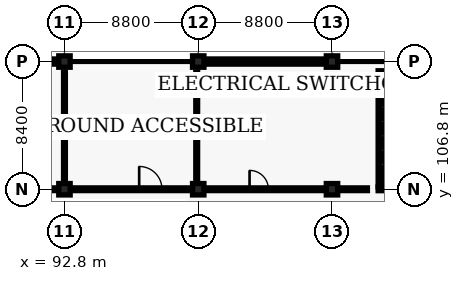
"""IFC4 building model, lengths in metres.
Left out: names, types, materials, properties, quantities, classifications, styles, units other than length and angle.
Written with IfcOpenShell. Run it as: python <this file> out.ifc"""

import sys

from ifc_helpers import new_model, si_unit, direction, frame, frame_2d, origin, origin_2d, place, context, subcontext, project, spatial, rectangle, extrude, element, fill, save


model = new_model("IFC4")
c1 = context("Model", 3, precision=1e-05, world=origin(), true_north=direction((0.0, 1.0)))
c2 = subcontext(c1, "Body", "Model", "MODEL_VIEW")
j1 = project(units=[si_unit("LENGTHUNIT", "METRE"), si_unit("PLANEANGLEUNIT", "RADIAN")], contexts=[c1])
p1 = place(None, origin())
s1 = spatial("IfcSite", under=j1, at=p1, CompositionType="ELEMENT")
p2 = place(p1, origin())
s2 = spatial("IfcBuilding", under=s1, at=p2, CompositionType="ELEMENT")
p3 = place(p2, origin())
s3 = spatial("IfcBuildingStorey", under=s2, at=p3, CompositionType="ELEMENT", Elevation=0.0)
for number, where, z_axis, x_axis in (
    (1, (92.8, 106.8, 0.0), (0.0, 0.0, 1.0), (1.0, 0.0, 0.0)),
    (2, (92.8, 115.2, 0.0), (0.0, 0.0, 1.0), (1.0, 0.0, 0.0)),
    (3, (101.6, 106.8, 0.0), (0.0, 0.0, 1.0), (1.0, 0.0, 0.0)),
    (4, (101.6, 115.2, 0.0), (0.0, 0.0, 1.0), (1.0, 0.0, 0.0)),
    (5, (110.4, 106.8, 0.0), (0.0, 0.0, 1.0), (1.0, 0.0, 0.0)),
    (6, (110.4, 115.2, 0.0), (0.0, 0.0, 1.0), (1.0, 0.0, 0.0)),
):
    element("IfcColumn", number, at=place(p3, frame(where, z_axis=z_axis, x_axis=x_axis)), inside=s3, PredefinedType="COLUMN", context=c2, shape_type="SweptSolid", body=[
        extrude(rectangle(XDim=0.75, YDim=0.75, at=origin_2d()), origin(), (0.0, 0.0, 1.0), 4.8),
    ])
p4 = place(p3, frame((84.1, 115.2, 0.0), z_axis=(0.0, 0.0, 1.0), x_axis=(1.0, 0.0, 0.0)))
e7 = element("IfcWall", 7, at=p4, inside=s3, PredefinedType="SOLIDWALL", context=c2, shape_type="SweptSolid", body=[
    extrude(rectangle(XDim=8.6, YDim=0.34, at=frame_2d((4.3, 0.0))), origin(), (0.0, 0.0, 1.0), 3.675),
])
p5 = place(p4, frame((1.817, 0.0, 0.95)))
e8 = element("IfcOpeningElement", 8, at=p5, cuts=e7, PredefinedType="OPENING", context=c2, shape_type="SweptSolid", body=[
    extrude(rectangle(XDim=2.1, YDim=1.8, at=frame_2d((1.05, 0.9))), frame((0.0, 0.18, 0.0), z_axis=(0.0, -1.0, 0.0), x_axis=(1.0, 0.0, 0.0)), (0.0, 0.0, 1.0), 0.36),
])
p6 = place(p4, frame((4.683, 0.0, 0.95)))
e9 = element("IfcOpeningElement", 9, at=p6, cuts=e7, PredefinedType="OPENING", context=c2, shape_type="SweptSolid", body=[
    extrude(rectangle(XDim=2.1, YDim=1.8, at=frame_2d((1.05, 0.9))), frame((0.0, 0.18, 0.0), z_axis=(0.0, -1.0, 0.0), x_axis=(1.0, 0.0, 0.0)), (0.0, 0.0, 1.0), 0.36),
])
p7 = place(p3, frame((101.7, 115.2, 0.0), z_axis=(0.0, 0.0, 1.0), x_axis=(1.0, 0.0, 0.0)))
e10 = element("IfcWall", 10, at=p7, inside=s3, PredefinedType="SOLIDWALL", context=c2, shape_type="SweptSolid", body=[
    extrude(rectangle(XDim=8.6, YDim=0.34, at=frame_2d((4.3, 0.0))), origin(), (0.0, 0.0, 1.0), 3.675),
])
p8 = place(p7, frame((1.817, 0.0, 0.95)))
e11 = element("IfcOpeningElement", 11, at=p8, cuts=e10, PredefinedType="OPENING", context=c2, shape_type="SweptSolid", body=[
    extrude(rectangle(XDim=2.1, YDim=1.8, at=frame_2d((1.05, 0.9))), frame((0.0, 0.18, 0.0), z_axis=(0.0, -1.0, 0.0), x_axis=(1.0, 0.0, 0.0)), (0.0, 0.0, 1.0), 0.36),
])
p9 = place(p7, frame((4.683, 0.0, 0.95)))
e12 = element("IfcOpeningElement", 12, at=p9, cuts=e10, PredefinedType="OPENING", context=c2, shape_type="SweptSolid", body=[
    extrude(rectangle(XDim=2.1, YDim=1.8, at=frame_2d((1.05, 0.9))), frame((0.0, 0.18, 0.0), z_axis=(0.0, -1.0, 0.0), x_axis=(1.0, 0.0, 0.0)), (0.0, 0.0, 1.0), 0.36),
])
p10 = place(p3, frame((117.045, 106.83, 0.0), z_axis=(0.0, 0.0, 1.0), x_axis=(-1.0, 0.0, 0.0)))
e13 = element("IfcWall", 13, at=p10, inside=s3, PredefinedType="SHEAR", context=c2, shape_type="SweptSolid", body=[
    extrude(rectangle(XDim=3.61, YDim=0.25, at=frame_2d((1.805, 0.0))), origin(), (0.0, 0.0, 1.0), 4.56),
])
p11 = place(p10, frame((1.205, 0.0, 0.0)))
e14 = element("IfcOpeningElement", 14, at=p11, cuts=e13, PredefinedType="OPENING", context=c2, shape_type="SweptSolid", body=[
    extrude(rectangle(XDim=1.2, YDim=2.15, at=frame_2d((0.6, 1.075))), frame((0.0, 0.135, 0.0), z_axis=(0.0, -1.0, 0.0), x_axis=(1.0, 0.0, 0.0)), (0.0, 0.0, 1.0), 0.27),
])
p12 = place(p3, frame((113.435, 114.47, 0.0), z_axis=(0.0, 0.0, 1.0), x_axis=(1.0, 0.0, 0.0)))
e15 = element("IfcWall", 15, at=p12, inside=s3, PredefinedType="SHEAR", context=c2, shape_type="SweptSolid", body=[
    extrude(rectangle(XDim=3.61, YDim=0.25, at=frame_2d((1.805, 0.0))), origin(), (0.0, 0.0, 1.0), 4.56),
])
p13 = place(p3, frame((113.56, 106.955, 0.0), z_axis=(0.0, 0.0, 1.0), x_axis=(0.0, 1.0, 0.0)))
e16 = element("IfcWall", 16, at=p13, inside=s3, PredefinedType="SHEAR", context=c2, shape_type="SweptSolid", body=[
    extrude(rectangle(XDim=7.39, YDim=0.25, at=frame_2d((3.695, 0.0))), origin(), (0.0, 0.0, 1.0), 4.56),
])
p14 = place(p3, frame((84.2, 106.8, 0.0), z_axis=(0.0, 0.0, 1.0), x_axis=(1.0, 0.0, 0.0)))
e17 = element("IfcWall", 17, at=p14, inside=s3, PredefinedType="PARTITIONING", context=c2, shape_type="SweptSolid", body=[
    extrude(rectangle(XDim=28.53, YDim=0.18, at=frame_2d((14.265, 0.0))), origin(), (0.0, 0.0, 1.0), 3.675),
])
p15 = place(p14, frame((6.033, 0.0, 0.0)))
e18 = element("IfcOpeningElement", 18, at=p15, cuts=e17, PredefinedType="OPENING", context=c2, shape_type="SweptSolid", body=[
    extrude(rectangle(XDim=1.3, YDim=2.2, at=frame_2d((0.65, 1.1))), frame((0.0, 0.1, 0.0), z_axis=(0.0, -1.0, 0.0), x_axis=(1.0, 0.0, 0.0)), (0.0, 0.0, 1.0), 0.2),
])
p16 = place(p14, frame((13.515, 0.0, 0.0)))
e19 = element("IfcOpeningElement", 19, at=p16, cuts=e17, PredefinedType="OPENING", context=c2, shape_type="SweptSolid", body=[
    extrude(rectangle(XDim=1.5, YDim=2.25, at=frame_2d((0.75, 1.125))), frame((0.0, 0.1, 0.0), z_axis=(0.0, -1.0, 0.0), x_axis=(1.0, 0.0, 0.0)), (0.0, 0.0, 1.0), 0.2),
])
p17 = place(p14, frame((20.777, 0.0, 0.0)))
e20 = element("IfcOpeningElement", 20, at=p17, cuts=e17, PredefinedType="OPENING", context=c2, shape_type="SweptSolid", body=[
    extrude(rectangle(XDim=1.24, YDim=2.2, at=frame_2d((0.62, 1.1))), frame((0.0, 0.1, 0.0), z_axis=(0.0, -1.0, 0.0), x_axis=(1.0, 0.0, 0.0)), (0.0, 0.0, 1.0), 0.2),
])
p18 = place(p3, frame((92.8, 107.3, 0.0), z_axis=(0.0, 0.0, 1.0), x_axis=(0.0, 1.0, 0.0)))
e21 = element("IfcWall", 21, at=p18, inside=s3, PredefinedType="PARTITIONING", context=c2, shape_type="SweptSolid", body=[
    extrude(rectangle(XDim=7.2, YDim=0.12, at=frame_2d((3.6, 0.0))), origin(), (0.0, 0.0, 1.0), 3.775),
])
p19 = place(p18, frame((3.07, 0.0, 0.0)))
e22 = element("IfcOpeningElement", 22, at=p19, cuts=e21, PredefinedType="OPENING", context=c2, shape_type="SweptSolid", body=[
    extrude(rectangle(XDim=1.06, YDim=2.16, at=frame_2d((0.53, 1.08))), frame((0.0, 0.07, 0.0), z_axis=(0.0, -1.0, 0.0), x_axis=(1.0, 0.0, 0.0)), (0.0, 0.0, 1.0), 0.14),
])
p20 = place(p3, frame((101.5, 107.3, 0.0), z_axis=(0.0, 0.0, 1.0), x_axis=(0.0, 1.0, 0.0)))
e23 = element("IfcWall", 23, at=p20, inside=s3, PredefinedType="PARTITIONING", context=c2, shape_type="SweptSolid", body=[
    extrude(rectangle(XDim=7.2, YDim=0.12, at=frame_2d((3.6, 0.0))), origin(), (0.0, 0.0, 1.0), 3.775),
])
p21 = place(p20, frame((3.1, 0.0, 0.0)))
e24 = element("IfcOpeningElement", 24, at=p21, cuts=e23, PredefinedType="OPENING", context=c2, shape_type="SweptSolid", body=[
    extrude(rectangle(XDim=1.0, YDim=2.14, at=frame_2d((0.5, 1.07))), frame((0.0, 0.07, 0.0), z_axis=(0.0, -1.0, 0.0), x_axis=(1.0, 0.0, 0.0)), (0.0, 0.0, 1.0), 0.14),
])
p22 = place(p8, origin())
e25 = element("IfcWindow", 25, at=p22, inside=s3, PartitioningType="SINGLE_PANEL", PredefinedType="WINDOW", context=c2, shape_type="SweptSolid", body=[
    extrude(rectangle(XDim=2.1, YDim=1.8, at=frame_2d((1.05, 0.9))), frame((0.0, 0.03, 0.0), z_axis=(0.0, -1.0, 0.0), x_axis=(1.0, 0.0, 0.0)), (0.0, 0.0, 1.0), 0.06),
])
fill(e11, e25)
p23 = place(p9, origin())
e26 = element("IfcWindow", 26, at=p23, inside=s3, PartitioningType="SINGLE_PANEL", PredefinedType="WINDOW", context=c2, shape_type="SweptSolid", body=[
    extrude(rectangle(XDim=2.1, YDim=1.8, at=frame_2d((1.05, 0.9))), frame((0.0, 0.03, 0.0), z_axis=(0.0, -1.0, 0.0), x_axis=(1.0, 0.0, 0.0)), (0.0, 0.0, 1.0), 0.06),
])
fill(e12, e26)
p24 = place(p16, origin())
e27 = element("IfcDoor", 27, at=p24, inside=s3, OperationType="DOUBLE_DOOR_SINGLE_SWING", PredefinedType="DOOR", context=c2, shape_type="SweptSolid", body=[
    extrude(rectangle(XDim=1.5, YDim=2.25, at=frame_2d((0.75, 1.125))), frame((0.0, 0.025, 0.0), z_axis=(0.0, -1.0, 0.0), x_axis=(1.0, 0.0, 0.0)), (0.0, 0.0, 1.0), 0.05),
])
fill(e19, e27)
p25 = place(p17, origin())
e28 = element("IfcDoor", 28, at=p25, inside=s3, OperationType="SINGLE_SWING_LEFT", PredefinedType="DOOR", context=c2, shape_type="SweptSolid", body=[
    extrude(rectangle(XDim=1.24, YDim=2.2, at=frame_2d((0.62, 1.1))), frame((0.0, 0.025, 0.0), z_axis=(0.0, -1.0, 0.0), x_axis=(1.0, 0.0, 0.0)), (0.0, 0.0, 1.0), 0.05),
])
fill(e20, e28)
p26 = place(p19, origin())
e29 = element("IfcDoor", 29, at=p26, inside=s3, OperationType="SINGLE_SWING_RIGHT", PredefinedType="DOOR", context=c2, shape_type="SweptSolid", body=[
    extrude(rectangle(XDim=1.06, YDim=2.16, at=frame_2d((0.53, 1.08))), frame((0.0, 0.025, 0.0), z_axis=(0.0, -1.0, 0.0), x_axis=(1.0, 0.0, 0.0)), (0.0, 0.0, 1.0), 0.05),
])
fill(e22, e29)
p27 = place(p21, origin())
e30 = element("IfcDoor", 30, at=p27, inside=s3, OperationType="SINGLE_SWING_LEFT", PredefinedType="DOOR", context=c2, shape_type="SweptSolid", body=[
    extrude(rectangle(XDim=1.0, YDim=2.14, at=frame_2d((0.5, 1.07))), frame((0.0, 0.025, 0.0), z_axis=(0.0, -1.0, 0.0), x_axis=(1.0, 0.0, 0.0)), (0.0, 0.0, 1.0), 0.05),
])
fill(e24, e30)
save(model, sys.argv[1])
